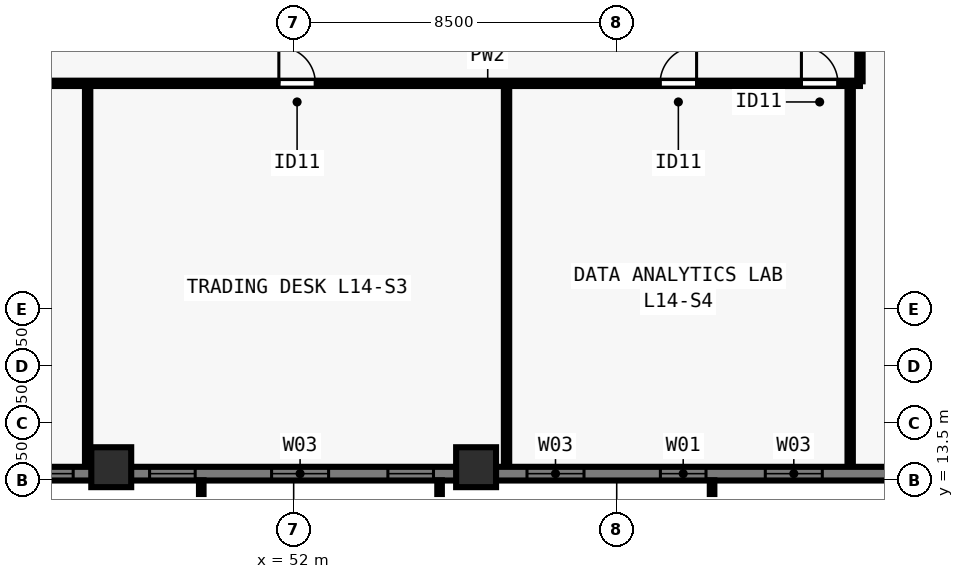
"""IFC4 building model, lengths in metres.
Left out: names, types, materials, properties, quantities, classifications, styles, units other than length and angle.
Written with IfcOpenShell. Run it as: python <this file> out.ifc"""

import sys

from ifc_helpers import new_model, si_unit, direction, frame, frame_2d, origin, origin_2d, place, context, subcontext, project, spatial, rectangle, extrude, element, fill, save


model = new_model("IFC4")
c1 = context("Model", 3, precision=1e-05, world=origin(), true_north=direction((0.0, 1.0)))
c2 = subcontext(c1, "Body", "Model", "MODEL_VIEW")
j1 = project(units=[si_unit("LENGTHUNIT", "METRE"), si_unit("PLANEANGLEUNIT", "RADIAN")], contexts=[c1])
p1 = place(None, origin())
s1 = spatial("IfcSite", under=j1, at=p1, CompositionType="ELEMENT")
p2 = place(p1, origin())
s2 = spatial("IfcBuilding", under=s1, at=p2, CompositionType="ELEMENT")
p3 = place(p2, frame((0.0, 0.0, 55.0)))
s3 = spatial("IfcBuildingStorey", under=s2, at=p3, CompositionType="ELEMENT", Elevation=55.0)
for number, where, z_axis, x_axis in (
    (1, (47.2, 13.85, 0.0), (0.0, 0.0, 1.0), (1.0, 0.0, 0.0)),
    (2, (56.8, 13.85, 0.0), (0.0, 0.0, 1.0), (1.0, 0.0, 0.0)),
):
    element("IfcColumn", number, at=place(p3, frame(where, z_axis=z_axis, x_axis=x_axis)), inside=s3, PredefinedType="COLUMN", context=c2, shape_type="SweptSolid", body=[
        extrude(rectangle(XDim=1.05, YDim=1.05, at=origin_2d()), origin(), (0.0, 0.0, 1.0), 3.5),
    ])
p4 = place(p3, frame((74.5, 13.68, 0.0), z_axis=(0.0, 0.0, 1.0), x_axis=(-1.0, 0.0, 0.0)))
e3 = element("IfcWall", 3, at=p4, inside=s3, PredefinedType="SOLIDWALL", context=c2, shape_type="SweptSolid", body=[
    extrude(rectangle(XDim=44.662, YDim=0.36, at=frame_2d((22.331, 0.0))), origin(), (0.0, 0.0, 1.0), 3.28),
])
p5 = place(p4, frame((4.93, 0.0, 0.8)))
e4 = element("IfcOpeningElement", 4, at=p5, cuts=e3, PredefinedType="OPENING", context=c2, shape_type="SweptSolid", body=[
    extrude(rectangle(XDim=1.2, YDim=1.544, at=frame_2d((0.6, 0.772))), frame((0.0, 0.19, 0.0), z_axis=(0.0, -1.0, 0.0), x_axis=(1.0, 0.0, 0.0)), (0.0, 0.0, 1.0), 0.38),
])
p6 = place(p4, frame((8.59, 0.0, 0.8)))
e5 = element("IfcOpeningElement", 5, at=p6, cuts=e3, PredefinedType="OPENING", context=c2, shape_type="SweptSolid", body=[
    extrude(rectangle(XDim=1.5, YDim=1.544, at=frame_2d((0.75, 0.772))), frame((0.0, 0.19, 0.0), z_axis=(0.0, -1.0, 0.0), x_axis=(1.0, 0.0, 0.0)), (0.0, 0.0, 1.0), 0.38),
])
p7 = place(p4, frame((11.65, 0.0, 0.8)))
e6 = element("IfcOpeningElement", 6, at=p7, cuts=e3, PredefinedType="OPENING", context=c2, shape_type="SweptSolid", body=[
    extrude(rectangle(XDim=1.2, YDim=1.544, at=frame_2d((0.6, 0.772))), frame((0.0, 0.19, 0.0), z_axis=(0.0, -1.0, 0.0), x_axis=(1.0, 0.0, 0.0)), (0.0, 0.0, 1.0), 0.38),
])
p8 = place(p4, frame((14.861, 0.0, 0.8)))
e7 = element("IfcOpeningElement", 7, at=p8, cuts=e3, PredefinedType="OPENING", context=c2, shape_type="SweptSolid", body=[
    extrude(rectangle(XDim=1.5, YDim=1.544, at=frame_2d((0.75, 0.772))), frame((0.0, 0.19, 0.0), z_axis=(0.0, -1.0, 0.0), x_axis=(1.0, 0.0, 0.0)), (0.0, 0.0, 1.0), 0.38),
])
p9 = place(p4, frame((18.821, 0.0, 0.8)))
e8 = element("IfcOpeningElement", 8, at=p9, cuts=e3, PredefinedType="OPENING", context=c2, shape_type="SweptSolid", body=[
    extrude(rectangle(XDim=1.2, YDim=1.544, at=frame_2d((0.6, 0.772))), frame((0.0, 0.19, 0.0), z_axis=(0.0, -1.0, 0.0), x_axis=(1.0, 0.0, 0.0)), (0.0, 0.0, 1.0), 0.38),
])
p10 = place(p4, frame((21.581, 0.0, 0.8)))
e9 = element("IfcOpeningElement", 9, at=p10, cuts=e3, PredefinedType="OPENING", context=c2, shape_type="SweptSolid", body=[
    extrude(rectangle(XDim=1.5, YDim=1.544, at=frame_2d((0.75, 0.772))), frame((0.0, 0.19, 0.0), z_axis=(0.0, -1.0, 0.0), x_axis=(1.0, 0.0, 0.0)), (0.0, 0.0, 1.0), 0.38),
])
p11 = place(p4, frame((25.091, 0.0, 0.8)))
e10 = element("IfcOpeningElement", 10, at=p11, cuts=e3, PredefinedType="OPENING", context=c2, shape_type="SweptSolid", body=[
    extrude(rectangle(XDim=1.2, YDim=1.544, at=frame_2d((0.6, 0.772))), frame((0.0, 0.19, 0.0), z_axis=(0.0, -1.0, 0.0), x_axis=(1.0, 0.0, 0.0)), (0.0, 0.0, 1.0), 0.38),
])
p12 = place(p4, frame((28.302, 0.0, 0.8)))
e11 = element("IfcOpeningElement", 11, at=p12, cuts=e3, PredefinedType="OPENING", context=c2, shape_type="SweptSolid", body=[
    extrude(rectangle(XDim=1.5, YDim=1.544, at=frame_2d((0.75, 0.772))), frame((0.0, 0.19, 0.0), z_axis=(0.0, -1.0, 0.0), x_axis=(1.0, 0.0, 0.0)), (0.0, 0.0, 1.0), 0.38),
])
p13 = place(p4, frame((31.812, 0.0, 0.8)))
e12 = element("IfcOpeningElement", 12, at=p13, cuts=e3, PredefinedType="OPENING", context=c2, shape_type="SweptSolid", body=[
    extrude(rectangle(XDim=1.2, YDim=1.544, at=frame_2d((0.6, 0.772))), frame((0.0, 0.19, 0.0), z_axis=(0.0, -1.0, 0.0), x_axis=(1.0, 0.0, 0.0)), (0.0, 0.0, 1.0), 0.38),
])
p14 = place(p4, frame((35.022, 0.0, 0.8)))
e13 = element("IfcOpeningElement", 13, at=p14, cuts=e3, PredefinedType="OPENING", context=c2, shape_type="SweptSolid", body=[
    extrude(rectangle(XDim=1.5, YDim=1.544, at=frame_2d((0.75, 0.772))), frame((0.0, 0.19, 0.0), z_axis=(0.0, -1.0, 0.0), x_axis=(1.0, 0.0, 0.0)), (0.0, 0.0, 1.0), 0.38),
])
p15 = place(p4, frame((38.532, 0.0, 0.8)))
e14 = element("IfcOpeningElement", 14, at=p15, cuts=e3, PredefinedType="OPENING", context=c2, shape_type="SweptSolid", body=[
    extrude(rectangle(XDim=1.2, YDim=1.544, at=frame_2d((0.6, 0.772))), frame((0.0, 0.19, 0.0), z_axis=(0.0, -1.0, 0.0), x_axis=(1.0, 0.0, 0.0)), (0.0, 0.0, 1.0), 0.38),
])
p16 = place(p3, frame((37.1, 23.95, 0.0), z_axis=(0.0, 0.0, 1.0), x_axis=(1.0, 0.0, 0.0)))
e15 = element("IfcWall", 15, at=p16, inside=s3, PredefinedType="PARTITIONING", context=c2, shape_type="SweptSolid", body=[
    extrude(rectangle(XDim=29.8, YDim=0.14, at=frame_2d((14.9, 0.0))), origin(), (0.0, 0.0, 1.0), 3.28),
])
p17 = place(p16, frame((4.191, 0.0, 0.0)))
e16 = element("IfcOpeningElement", 16, at=p17, cuts=e15, PredefinedType="OPENING", context=c2, shape_type="SweptSolid", body=[
    extrude(rectangle(XDim=0.96, YDim=2.12, at=frame_2d((0.48, 1.06))), frame((0.0, 0.08, 0.0), z_axis=(0.0, -1.0, 0.0), x_axis=(1.0, 0.0, 0.0)), (0.0, 0.0, 1.0), 0.16),
])
p18 = place(p16, frame((5.358, 0.0, 0.0)))
e17 = element("IfcOpeningElement", 17, at=p18, cuts=e15, PredefinedType="OPENING", context=c2, shape_type="SweptSolid", body=[
    extrude(rectangle(XDim=0.96, YDim=2.12, at=frame_2d((0.48, 1.06))), frame((0.0, 0.08, 0.0), z_axis=(0.0, -1.0, 0.0), x_axis=(1.0, 0.0, 0.0)), (0.0, 0.0, 1.0), 0.16),
])
p19 = place(p16, frame((14.51, 0.0, 0.0)))
e18 = element("IfcOpeningElement", 18, at=p19, cuts=e15, PredefinedType="OPENING", context=c2, shape_type="SweptSolid", body=[
    extrude(rectangle(XDim=0.96, YDim=2.12, at=frame_2d((0.48, 1.06))), frame((0.0, 0.08, 0.0), z_axis=(0.0, -1.0, 0.0), x_axis=(1.0, 0.0, 0.0)), (0.0, 0.0, 1.0), 0.16),
])
p20 = place(p16, frame((24.542, 0.0, 0.0)))
e19 = element("IfcOpeningElement", 19, at=p20, cuts=e15, PredefinedType="OPENING", context=c2, shape_type="SweptSolid", body=[
    extrude(rectangle(XDim=0.96, YDim=2.12, at=frame_2d((0.48, 1.06))), frame((0.0, 0.08, 0.0), z_axis=(0.0, -1.0, 0.0), x_axis=(1.0, 0.0, 0.0)), (0.0, 0.0, 1.0), 0.16),
])
p21 = place(p16, frame((28.26, 0.0, 0.0)))
e20 = element("IfcOpeningElement", 20, at=p21, cuts=e15, PredefinedType="OPENING", context=c2, shape_type="SweptSolid", body=[
    extrude(rectangle(XDim=0.96, YDim=2.12, at=frame_2d((0.48, 1.06))), frame((0.0, 0.08, 0.0), z_axis=(0.0, -1.0, 0.0), x_axis=(1.0, 0.0, 0.0)), (0.0, 0.0, 1.0), 0.16),
])
p22 = place(p3, frame((66.9, 24.005, 0.0), z_axis=(0.0, 0.0, 1.0), x_axis=(0.0, 1.0, 0.0)))
e21 = element("IfcWall", 21, at=p22, inside=s3, PredefinedType="PARTITIONING", context=c2, shape_type="SweptSolid", body=[
    extrude(rectangle(XDim=29.99, YDim=0.14, at=frame_2d((14.995, 0.0))), origin(), (0.0, 0.0, 1.0), 3.28),
])
p23 = place(p22, frame((4.344, 0.0, 0.0)))
e22 = element("IfcOpeningElement", 22, at=p23, cuts=e21, PredefinedType="OPENING", context=c2, shape_type="SweptSolid", body=[
    extrude(rectangle(XDim=0.96, YDim=2.12, at=frame_2d((0.48, 1.06))), frame((0.0, 0.08, 0.0), z_axis=(0.0, -1.0, 0.0), x_axis=(1.0, 0.0, 0.0)), (0.0, 0.0, 1.0), 0.16),
])
p24 = place(p22, frame((14.452, 0.0, 0.0)))
e23 = element("IfcOpeningElement", 23, at=p24, cuts=e21, PredefinedType="OPENING", context=c2, shape_type="SweptSolid", body=[
    extrude(rectangle(XDim=0.96, YDim=2.12, at=frame_2d((0.48, 1.06))), frame((0.0, 0.08, 0.0), z_axis=(0.0, -1.0, 0.0), x_axis=(1.0, 0.0, 0.0)), (0.0, 0.0, 1.0), 0.16),
])
p25 = place(p22, frame((24.623, 0.0, 0.0)))
e24 = element("IfcOpeningElement", 24, at=p25, cuts=e21, PredefinedType="OPENING", context=c2, shape_type="SweptSolid", body=[
    extrude(rectangle(XDim=0.96, YDim=2.12, at=frame_2d((0.48, 1.06))), frame((0.0, 0.08, 0.0), z_axis=(0.0, -1.0, 0.0), x_axis=(1.0, 0.0, 0.0)), (0.0, 0.0, 1.0), 0.16),
])
for number, where, z_axis, x_axis in (
    (25, (46.579, 13.92, 0.0), (0.0, 0.0, 1.0), (0.0, 1.0, 0.0)),
    (26, (57.601, 13.92, 0.0), (0.0, 0.0, 1.0), (0.0, 1.0, 0.0)),
):
    element("IfcWall", number, at=place(p3, frame(where, z_axis=z_axis, x_axis=x_axis)), inside=s3, PredefinedType="PARTITIONING", context=c2, shape_type="SweptSolid", body=[
        extrude(rectangle(XDim=9.93, YDim=0.14, at=frame_2d((4.965, 0.0))), origin(), (0.0, 0.0, 1.0), 3.28),
    ])
p26 = place(p3, frame((66.643, 13.92, 0.0), z_axis=(0.0, 0.0, 1.0), x_axis=(0.0, 1.0, 0.0)))
e27 = element("IfcWall", 27, at=p26, inside=s3, PredefinedType="PARTITIONING", context=c2, shape_type="SweptSolid", body=[
    extrude(rectangle(XDim=9.93, YDim=0.14, at=frame_2d((4.965, 0.0))), origin(), (0.0, 0.0, 1.0), 2.439),
])
p27 = place(p6, origin())
e28 = element("IfcWindow", 28, at=p27, inside=s3, PartitioningType="SINGLE_PANEL", PredefinedType="WINDOW", context=c2, shape_type="SweptSolid", body=[
    extrude(rectangle(XDim=1.5, YDim=1.544, at=frame_2d((0.75, 0.772))), frame((0.0, -0.05, 0.0), z_axis=(0.0, -1.0, 0.0), x_axis=(1.0, 0.0, 0.0)), (0.0, 0.0, 1.0), 0.06),
])
fill(e5, e28)
p28 = place(p7, origin())
e29 = element("IfcWindow", 29, at=p28, inside=s3, PartitioningType="SINGLE_PANEL", PredefinedType="WINDOW", context=c2, shape_type="SweptSolid", body=[
    extrude(rectangle(XDim=1.2, YDim=1.544, at=frame_2d((0.6, 0.772))), frame((0.0, -0.05, 0.0), z_axis=(0.0, -1.0, 0.0), x_axis=(1.0, 0.0, 0.0)), (0.0, 0.0, 1.0), 0.06),
])
fill(e6, e29)
p29 = place(p8, origin())
e30 = element("IfcWindow", 30, at=p29, inside=s3, PartitioningType="SINGLE_PANEL", PredefinedType="WINDOW", context=c2, shape_type="SweptSolid", body=[
    extrude(rectangle(XDim=1.5, YDim=1.544, at=frame_2d((0.75, 0.772))), frame((0.0, -0.05, 0.0), z_axis=(0.0, -1.0, 0.0), x_axis=(1.0, 0.0, 0.0)), (0.0, 0.0, 1.0), 0.06),
])
fill(e7, e30)
p30 = place(p9, origin())
e31 = element("IfcWindow", 31, at=p30, inside=s3, PartitioningType="SINGLE_PANEL", PredefinedType="WINDOW", context=c2, shape_type="SweptSolid", body=[
    extrude(rectangle(XDim=1.2, YDim=1.544, at=frame_2d((0.6, 0.772))), frame((0.0, -0.05, 0.0), z_axis=(0.0, -1.0, 0.0), x_axis=(1.0, 0.0, 0.0)), (0.0, 0.0, 1.0), 0.06),
])
fill(e8, e31)
p31 = place(p10, origin())
e32 = element("IfcWindow", 32, at=p31, inside=s3, PartitioningType="SINGLE_PANEL", PredefinedType="WINDOW", context=c2, shape_type="SweptSolid", body=[
    extrude(rectangle(XDim=1.5, YDim=1.544, at=frame_2d((0.75, 0.772))), frame((0.0, -0.05, 0.0), z_axis=(0.0, -1.0, 0.0), x_axis=(1.0, 0.0, 0.0)), (0.0, 0.0, 1.0), 0.06),
])
fill(e9, e32)
p32 = place(p11, origin())
e33 = element("IfcWindow", 33, at=p32, inside=s3, PartitioningType="SINGLE_PANEL", PredefinedType="WINDOW", context=c2, shape_type="SweptSolid", body=[
    extrude(rectangle(XDim=1.2, YDim=1.544, at=frame_2d((0.6, 0.772))), frame((0.0, -0.05, 0.0), z_axis=(0.0, -1.0, 0.0), x_axis=(1.0, 0.0, 0.0)), (0.0, 0.0, 1.0), 0.06),
])
fill(e10, e33)
p33 = place(p12, origin())
e34 = element("IfcWindow", 34, at=p33, inside=s3, PartitioningType="SINGLE_PANEL", PredefinedType="WINDOW", context=c2, shape_type="SweptSolid", body=[
    extrude(rectangle(XDim=1.5, YDim=1.544, at=frame_2d((0.75, 0.772))), frame((0.0, -0.05, 0.0), z_axis=(0.0, -1.0, 0.0), x_axis=(1.0, 0.0, 0.0)), (0.0, 0.0, 1.0), 0.06),
])
fill(e11, e34)
p34 = place(p19, origin())
e35 = element("IfcDoor", 35, at=p34, inside=s3, OperationType="SINGLE_SWING_LEFT", PredefinedType="DOOR", context=c2, shape_type="SweptSolid", body=[
    extrude(rectangle(XDim=0.96, YDim=2.12, at=frame_2d((0.48, 1.06))), frame((0.0, 0.025, 0.0), z_axis=(0.0, -1.0, 0.0), x_axis=(1.0, 0.0, 0.0)), (0.0, 0.0, 1.0), 0.05),
])
fill(e18, e35)
p35 = place(p20, origin())
e36 = element("IfcDoor", 36, at=p35, inside=s3, OperationType="SINGLE_SWING_RIGHT", PredefinedType="DOOR", context=c2, shape_type="SweptSolid", body=[
    extrude(rectangle(XDim=0.96, YDim=2.12, at=frame_2d((0.48, 1.06))), frame((0.0, 0.025, 0.0), z_axis=(0.0, -1.0, 0.0), x_axis=(1.0, 0.0, 0.0)), (0.0, 0.0, 1.0), 0.05),
])
fill(e19, e36)
p36 = place(p21, origin())
e37 = element("IfcDoor", 37, at=p36, inside=s3, OperationType="SINGLE_SWING_LEFT", PredefinedType="DOOR", context=c2, shape_type="SweptSolid", body=[
    extrude(rectangle(XDim=0.96, YDim=2.12, at=frame_2d((0.48, 1.06))), frame((0.0, 0.025, 0.0), z_axis=(0.0, -1.0, 0.0), x_axis=(1.0, 0.0, 0.0)), (0.0, 0.0, 1.0), 0.05),
])
fill(e20, e37)
save(model, sys.argv[1])
